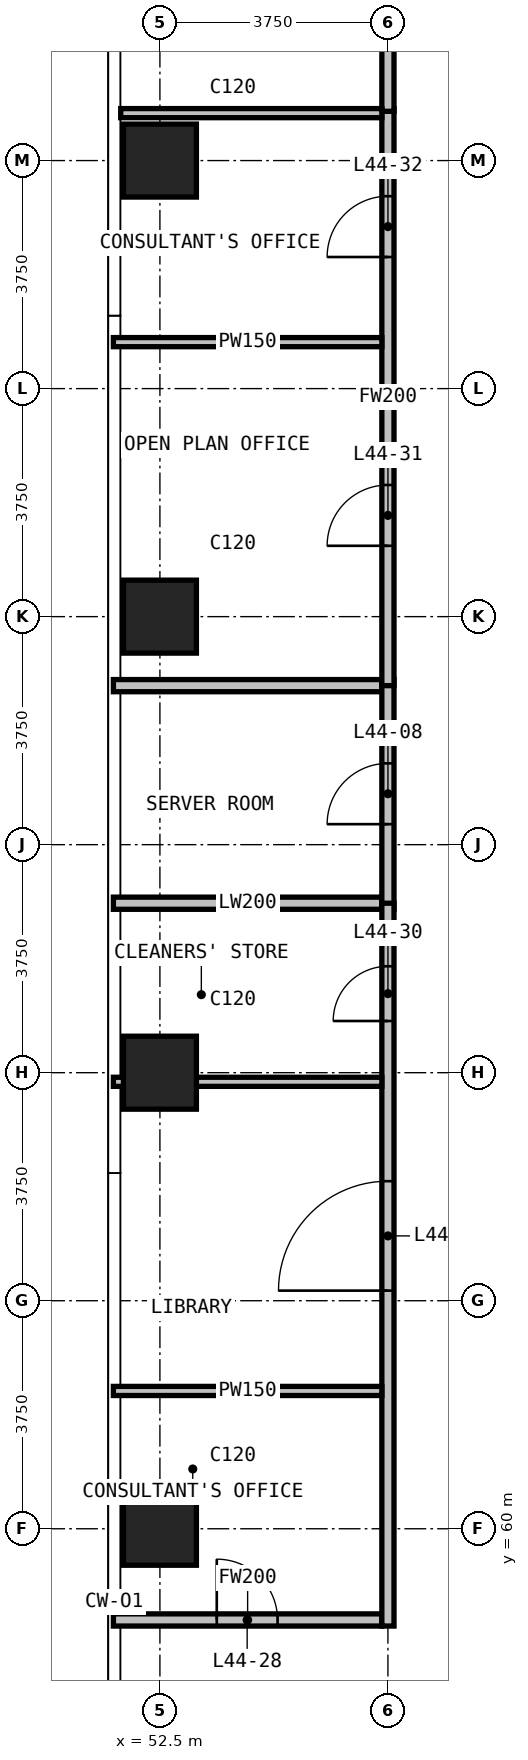
"""IFC4 building model, lengths in metres.
Left out: names, types, materials, properties, quantities, classifications, styles, units other than length and angle.
Written with IfcOpenShell. Run it as: python <this file> out.ifc"""

import sys

from ifc_helpers import new_model, si_unit, direction, frame, frame_2d, origin, origin_2d, place, context, subcontext, project, spatial, rectangle, extrude, element, fill, save


model = new_model("IFC4")
c1 = context("Model", 3, precision=1e-05, world=origin(), true_north=direction((0.0, 1.0)))
c2 = subcontext(c1, "Body", "Model", "MODEL_VIEW")
j1 = project(units=[si_unit("LENGTHUNIT", "METRE"), si_unit("PLANEANGLEUNIT", "RADIAN")], contexts=[c1])
p1 = place(None, origin())
s1 = spatial("IfcSite", under=j1, at=p1, CompositionType="ELEMENT")
p2 = place(p1, origin())
s2 = spatial("IfcBuilding", under=s1, at=p2, CompositionType="ELEMENT")
p3 = place(p2, frame((0.0, 0.0, 172.9)))
s3 = spatial("IfcBuildingStorey", under=s2, at=p3, CompositionType="ELEMENT", Elevation=172.9)
for number, where, z_axis, x_axis in (
    (1, (52.5, 60.0, 0.0), (0.0, 0.0, 1.0), (1.0, 0.0, 0.0)),
    (2, (52.5, 67.5, 0.0), (0.0, 0.0, 1.0), (1.0, 0.0, 0.0)),
    (3, (52.5, 75.0, 0.0), (0.0, 0.0, 1.0), (1.0, 0.0, 0.0)),
    (4, (52.5, 82.5, 0.0), (0.0, 0.0, 1.0), (1.0, 0.0, 0.0)),
):
    element("IfcColumn", number, at=place(p3, frame(where, z_axis=z_axis, x_axis=x_axis)), inside=s3, PredefinedType="COLUMN", context=c2, shape_type="SweptSolid", body=[
        extrude(rectangle(XDim=1.2, YDim=1.2, at=origin_2d()), origin(), (0.0, 0.0, 1.0), 3.6),
    ])
for number, where, z_axis, x_axis in (
    (5, (51.735, 70.287, 0.0), (0.0, 0.0, 1.0), (1.0, 0.0, 0.0)),
    (6, (51.735, 73.865, 0.0), (0.0, 0.0, 1.0), (1.0, 0.0, 0.0)),
):
    element("IfcWall", number, at=place(p3, frame(where, z_axis=z_axis, x_axis=x_axis)), inside=s3, PredefinedType="PARTITIONING", context=c2, shape_type="SweptSolid", body=[
        extrude(rectangle(XDim=4.415, YDim=0.2, at=frame_2d((2.208, 0.0))), origin(), (0.0, 0.0, 1.0), 3.3),
    ])
p4 = place(p3, frame((56.25, 70.187, 0.0), z_axis=(0.0, 0.0, 1.0), x_axis=(0.0, 1.0, 0.0)))
e7 = element("IfcWall", 7, at=p4, inside=s3, PredefinedType="PARTITIONING", context=c2, shape_type="SweptSolid", body=[
    extrude(rectangle(XDim=3.778, YDim=0.2, at=frame_2d((1.889, 0.0))), origin(), (0.0, 0.0, 1.0), 3.3),
])
p5 = place(p4, frame((1.4, 0.0, 0.0)))
e8 = element("IfcOpeningElement", 8, at=p5, cuts=e7, PredefinedType="OPENING", context=c2, shape_type="SweptSolid", body=[
    extrude(rectangle(XDim=1.0, YDim=2.2, at=frame_2d((0.5, 1.1))), frame((0.0, 0.11, 0.0), z_axis=(0.0, -1.0, 0.0), x_axis=(1.0, 0.0, 0.0)), (0.0, 0.0, 1.0), 0.22),
])
p6 = place(p3, frame((51.735, 58.5, 0.0), z_axis=(0.0, 0.0, 1.0), x_axis=(1.0, 0.0, 0.0)))
e9 = element("IfcWall", 9, at=p6, inside=s3, PredefinedType="PARTITIONING", context=c2, shape_type="SweptSolid", body=[
    extrude(rectangle(XDim=4.415, YDim=0.2, at=frame_2d((2.208, 0.0))), origin(), (0.0, 0.0, 1.0), 3.3),
])
p7 = place(p6, frame((1.7, 0.0, 0.0)))
e10 = element("IfcOpeningElement", 10, at=p7, cuts=e9, PredefinedType="OPENING", context=c2, shape_type="SweptSolid", body=[
    extrude(rectangle(XDim=1.0, YDim=2.2, at=frame_2d((0.5, 1.1))), frame((0.0, 0.11, 0.0), z_axis=(0.0, -1.0, 0.0), x_axis=(1.0, 0.0, 0.0)), (0.0, 0.0, 1.0), 0.22),
])
p8 = place(p3, frame((56.25, 58.4, 0.0), z_axis=(0.0, 0.0, 1.0), x_axis=(0.0, 1.0, 0.0)))
e11 = element("IfcWall", 11, at=p8, inside=s3, PredefinedType="PARTITIONING", context=c2, shape_type="SweptSolid", body=[
    extrude(rectangle(XDim=11.887, YDim=0.2, at=frame_2d((5.944, 0.0))), origin(), (0.0, 0.0, 1.0), 3.3),
])
p9 = place(p8, frame((5.516, 0.0, 0.0)))
e12 = element("IfcOpeningElement", 12, at=p9, cuts=e11, PredefinedType="OPENING", context=c2, shape_type="SweptSolid", body=[
    extrude(rectangle(XDim=1.8, YDim=2.2, at=frame_2d((0.9, 1.1))), frame((0.0, 0.11, 0.0), z_axis=(0.0, -1.0, 0.0), x_axis=(1.0, 0.0, 0.0)), (0.0, 0.0, 1.0), 0.22),
])
p10 = place(p8, frame((9.95, 0.0, 0.0)))
e13 = element("IfcOpeningElement", 13, at=p10, cuts=e11, PredefinedType="OPENING", context=c2, shape_type="SweptSolid", body=[
    extrude(rectangle(XDim=0.9, YDim=2.2, at=frame_2d((0.45, 1.1))), frame((0.0, 0.11, 0.0), z_axis=(0.0, -1.0, 0.0), x_axis=(1.0, 0.0, 0.0)), (0.0, 0.0, 1.0), 0.22),
])
p11 = place(p3, frame((56.25, 73.865, 0.0), z_axis=(0.0, 0.0, 1.0), x_axis=(0.0, 1.0, 0.0)))
e14 = element("IfcWall", 14, at=p11, inside=s3, PredefinedType="PARTITIONING", context=c2, shape_type="SweptSolid", body=[
    extrude(rectangle(XDim=9.49, YDim=0.2, at=frame_2d((4.745, 0.0))), origin(), (0.0, 0.0, 1.0), 3.3),
])
p12 = place(p11, frame((2.3, 0.0, 0.0)))
e15 = element("IfcOpeningElement", 15, at=p12, cuts=e14, PredefinedType="OPENING", context=c2, shape_type="SweptSolid", body=[
    extrude(rectangle(XDim=1.0, YDim=2.2, at=frame_2d((0.5, 1.1))), frame((0.0, 0.11, 0.0), z_axis=(0.0, -1.0, 0.0), x_axis=(1.0, 0.0, 0.0)), (0.0, 0.0, 1.0), 0.22),
])
p13 = place(p11, frame((7.049, 0.0, 0.0)))
e16 = element("IfcOpeningElement", 16, at=p13, cuts=e14, PredefinedType="OPENING", context=c2, shape_type="SweptSolid", body=[
    extrude(rectangle(XDim=1.0, YDim=2.2, at=frame_2d((0.5, 1.1))), frame((0.0, 0.11, 0.0), z_axis=(0.0, -1.0, 0.0), x_axis=(1.0, 0.0, 0.0)), (0.0, 0.0, 1.0), 0.22),
])
p14 = place(p3, frame((56.25, 83.31, 0.0), z_axis=(0.0, 0.0, 1.0), x_axis=(0.0, 1.0, 0.0)))
e17 = element("IfcWall", 17, at=p14, inside=s3, PredefinedType="PARTITIONING", context=c2, shape_type="SweptSolid", body=[
    extrude(rectangle(XDim=7.335, YDim=0.2, at=frame_2d((3.667, 0.0))), origin(), (0.0, 0.0, 1.0), 3.3),
])
for number, where, z_axis, x_axis in (
    (18, (51.735, 62.266, 0.0), (0.0, 0.0, 1.0), (1.0, 0.0, 0.0)),
    (19, (51.735, 67.35, 0.0), (0.0, 0.0, 1.0), (1.0, 0.0, 0.0)),
    (20, (51.735, 79.514, 0.0), (0.0, 0.0, 1.0), (1.0, 0.0, 0.0)),
):
    element("IfcWall", number, at=place(p3, frame(where, z_axis=z_axis, x_axis=x_axis)), inside=s3, PredefinedType="PARTITIONING", context=c2, shape_type="SweptSolid", body=[
        extrude(rectangle(XDim=4.415, YDim=0.15, at=frame_2d((2.208, 0.0))), origin(), (0.0, 0.0, 1.0), 3.3),
    ])
p15 = place(p3, frame((51.855, 83.28, 0.0), z_axis=(0.0, 0.0, 1.0), x_axis=(1.0, 0.0, 0.0)))
e21 = element("IfcWall", 21, at=p15, inside=s3, PredefinedType="PARTITIONING", context=c2, shape_type="SweptSolid", body=[
    extrude(rectangle(XDim=4.295, YDim=0.15, at=frame_2d((2.147, 0.0))), origin(), (0.0, 0.0, 1.0), 3.3),
])
p16 = place(p5, origin())
e22 = element("IfcDoor", 22, at=p16, inside=s3, OperationType="SINGLE_SWING_LEFT", PredefinedType="DOOR", context=c2, shape_type="SweptSolid", body=[
    extrude(rectangle(XDim=1.0, YDim=2.2, at=frame_2d((0.5, 1.1))), frame((0.0, 0.025, 0.0), z_axis=(0.0, -1.0, 0.0), x_axis=(1.0, 0.0, 0.0)), (0.0, 0.0, 1.0), 0.05),
])
fill(e8, e22)
p17 = place(p7, origin())
e23 = element("IfcDoor", 23, at=p17, inside=s3, OperationType="SINGLE_SWING_LEFT", PredefinedType="DOOR", context=c2, shape_type="SweptSolid", body=[
    extrude(rectangle(XDim=1.0, YDim=2.2, at=frame_2d((0.5, 1.1))), frame((0.0, 0.025, 0.0), z_axis=(0.0, -1.0, 0.0), x_axis=(1.0, 0.0, 0.0)), (0.0, 0.0, 1.0), 0.05),
])
fill(e10, e23)
p18 = place(p9, origin())
e24 = element("IfcDoor", 24, at=p18, inside=s3, OperationType="DOUBLE_DOOR_SINGLE_SWING", PredefinedType="DOOR", context=c2, shape_type="SweptSolid", body=[
    extrude(rectangle(XDim=1.8, YDim=2.2, at=frame_2d((0.9, 1.1))), frame((0.0, 0.025, 0.0), z_axis=(0.0, -1.0, 0.0), x_axis=(1.0, 0.0, 0.0)), (0.0, 0.0, 1.0), 0.05),
])
fill(e12, e24)
p19 = place(p10, origin())
e25 = element("IfcDoor", 25, at=p19, inside=s3, OperationType="SINGLE_SWING_RIGHT", PredefinedType="DOOR", context=c2, shape_type="SweptSolid", body=[
    extrude(rectangle(XDim=0.9, YDim=2.2, at=frame_2d((0.45, 1.1))), frame((0.0, 0.025, 0.0), z_axis=(0.0, -1.0, 0.0), x_axis=(1.0, 0.0, 0.0)), (0.0, 0.0, 1.0), 0.05),
])
fill(e13, e25)
p20 = place(p12, origin())
e26 = element("IfcDoor", 26, at=p20, inside=s3, OperationType="SINGLE_SWING_RIGHT", PredefinedType="DOOR", context=c2, shape_type="SweptSolid", body=[
    extrude(rectangle(XDim=1.0, YDim=2.2, at=frame_2d((0.5, 1.1))), frame((0.0, 0.025, 0.0), z_axis=(0.0, -1.0, 0.0), x_axis=(1.0, 0.0, 0.0)), (0.0, 0.0, 1.0), 0.05),
])
fill(e15, e26)
p21 = place(p13, origin())
e27 = element("IfcDoor", 27, at=p21, inside=s3, OperationType="SINGLE_SWING_RIGHT", PredefinedType="DOOR", context=c2, shape_type="SweptSolid", body=[
    extrude(rectangle(XDim=1.0, YDim=2.2, at=frame_2d((0.5, 1.1))), frame((0.0, 0.025, 0.0), z_axis=(0.0, -1.0, 0.0), x_axis=(1.0, 0.0, 0.0)), (0.0, 0.0, 1.0), 0.05),
])
fill(e16, e27)
save(model, sys.argv[1])
